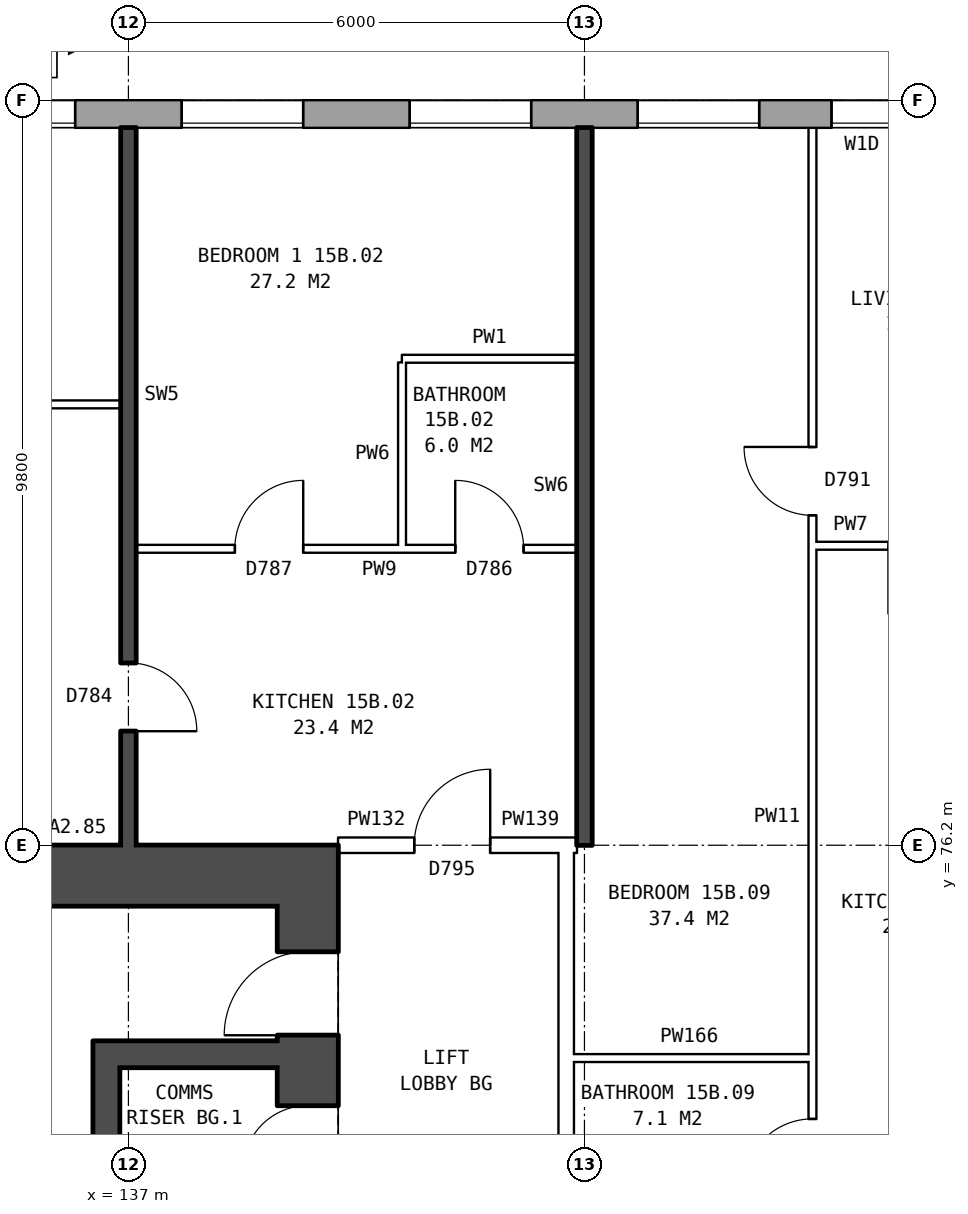
"""IFC4 building model, lengths in metres.
Left out: names, types, materials, properties, quantities, classifications, styles, units other than length and angle.
Written with IfcOpenShell. Run it as: python <this file> out.ifc"""

import sys

from ifc_helpers import new_model, si_unit, direction, frame, frame_2d, origin, place, context, subcontext, project, spatial, rectangle, extrude, element, fill, save


model = new_model("IFC4")
c1 = context("Model", 3, precision=1e-05, world=origin(), true_north=direction((0.0, 1.0)))
c2 = subcontext(c1, "Body", "Model", "MODEL_VIEW")
j1 = project(units=[si_unit("LENGTHUNIT", "METRE"), si_unit("PLANEANGLEUNIT", "RADIAN")], contexts=[c1])
p1 = place(None, origin())
s1 = spatial("IfcSite", under=j1, at=p1, CompositionType="ELEMENT")
p2 = place(p1, origin())
s2 = spatial("IfcBuilding", under=s1, at=p2, CompositionType="ELEMENT")
p3 = place(p2, frame((0.0, 0.0, 56.7)))
s3 = spatial("IfcBuildingStorey", under=s2, at=p3, CompositionType="ELEMENT", Elevation=56.7)
p4 = place(p3, frame((173.425, 85.82, 0.0), z_axis=(0.0, 0.0, 1.0), x_axis=(-1.0, 0.0, 0.0)))
e1 = element("IfcWall", 1, at=p4, inside=s3, PredefinedType="STANDARD", context=c2, shape_type="SweptSolid", body=[
    extrude(rectangle(XDim=39.351, YDim=0.36, at=frame_2d((19.675, 0.0))), origin(), (0.0, 0.0, 1.0), 2.85),
])
p5 = place(p4, frame((1.125, 0.0, 0.8)))
e2 = element("IfcOpeningElement", 2, at=p5, cuts=e1, PredefinedType="OPENING", context=c2, shape_type="SweptSolid", body=[
    extrude(rectangle(XDim=1.6, YDim=1.8, at=frame_2d((0.8, 0.9))), frame((0.0, 0.19, 0.0), z_axis=(0.0, -1.0, 0.0), x_axis=(1.0, 0.0, 0.0)), (0.0, 0.0, 1.0), 0.38),
])
p6 = place(p4, frame((4.125, 0.0, 0.8)))
e3 = element("IfcOpeningElement", 3, at=p6, cuts=e1, PredefinedType="OPENING", context=c2, shape_type="SweptSolid", body=[
    extrude(rectangle(XDim=1.6, YDim=1.8, at=frame_2d((0.8, 0.9))), frame((0.0, 0.19, 0.0), z_axis=(0.0, -1.0, 0.0), x_axis=(1.0, 0.0, 0.0)), (0.0, 0.0, 1.0), 0.38),
])
p7 = place(p4, frame((7.125, 0.0, 0.8)))
e4 = element("IfcOpeningElement", 4, at=p7, cuts=e1, PredefinedType="OPENING", context=c2, shape_type="SweptSolid", body=[
    extrude(rectangle(XDim=1.6, YDim=1.8, at=frame_2d((0.8, 0.9))), frame((0.0, 0.19, 0.0), z_axis=(0.0, -1.0, 0.0), x_axis=(1.0, 0.0, 0.0)), (0.0, 0.0, 1.0), 0.38),
])
p8 = place(p4, frame((10.125, 0.0, 0.8)))
e5 = element("IfcOpeningElement", 5, at=p8, cuts=e1, PredefinedType="OPENING", context=c2, shape_type="SweptSolid", body=[
    extrude(rectangle(XDim=1.6, YDim=1.8, at=frame_2d((0.8, 0.9))), frame((0.0, 0.19, 0.0), z_axis=(0.0, -1.0, 0.0), x_axis=(1.0, 0.0, 0.0)), (0.0, 0.0, 1.0), 0.38),
])
p9 = place(p4, frame((12.625, 0.0, 1.25)))
e6 = element("IfcOpeningElement", 6, at=p9, cuts=e1, PredefinedType="OPENING", context=c2, shape_type="SweptSolid", body=[
    extrude(rectangle(XDim=0.8, YDim=1.2, at=frame_2d((0.4, 0.6))), frame((0.0, 0.19, 0.0), z_axis=(0.0, -1.0, 0.0), x_axis=(1.0, 0.0, 0.0)), (0.0, 0.0, 1.0), 0.38),
])
p10 = place(p4, frame((16.125, 0.0, 0.8)))
e7 = element("IfcOpeningElement", 7, at=p10, cuts=e1, PredefinedType="OPENING", context=c2, shape_type="SweptSolid", body=[
    extrude(rectangle(XDim=1.6, YDim=1.8, at=frame_2d((0.8, 0.9))), frame((0.0, 0.19, 0.0), z_axis=(0.0, -1.0, 0.0), x_axis=(1.0, 0.0, 0.0)), (0.0, 0.0, 1.0), 0.38),
])
p11 = place(p4, frame((19.125, 0.0, 0.8)))
e8 = element("IfcOpeningElement", 8, at=p11, cuts=e1, PredefinedType="OPENING", context=c2, shape_type="SweptSolid", body=[
    extrude(rectangle(XDim=1.6, YDim=1.8, at=frame_2d((0.8, 0.9))), frame((0.0, 0.19, 0.0), z_axis=(0.0, -1.0, 0.0), x_axis=(1.0, 0.0, 0.0)), (0.0, 0.0, 1.0), 0.38),
])
p12 = place(p4, frame((21.575, 0.0, 0.8)))
e9 = element("IfcOpeningElement", 9, at=p12, cuts=e1, PredefinedType="OPENING", context=c2, shape_type="SweptSolid", body=[
    extrude(rectangle(XDim=1.4, YDim=1.8, at=frame_2d((0.7, 0.9))), frame((0.0, 0.19, 0.0), z_axis=(0.0, -1.0, 0.0), x_axis=(1.0, 0.0, 0.0)), (0.0, 0.0, 1.0), 0.38),
])
p13 = place(p4, frame((25.275, 0.0, 1.7)))
e10 = element("IfcOpeningElement", 10, at=p13, cuts=e1, PredefinedType="OPENING", context=c2, shape_type="SweptSolid", body=[
    extrude(rectangle(XDim=0.8, YDim=0.9, at=frame_2d((0.4, 0.45))), frame((0.0, 0.19, 0.0), z_axis=(0.0, -1.0, 0.0), x_axis=(1.0, 0.0, 0.0)), (0.0, 0.0, 1.0), 0.38),
])
p14 = place(p4, frame((28.125, 0.0, 0.8)))
e11 = element("IfcOpeningElement", 11, at=p14, cuts=e1, PredefinedType="OPENING", context=c2, shape_type="SweptSolid", body=[
    extrude(rectangle(XDim=1.6, YDim=1.8, at=frame_2d((0.8, 0.9))), frame((0.0, 0.19, 0.0), z_axis=(0.0, -1.0, 0.0), x_axis=(1.0, 0.0, 0.0)), (0.0, 0.0, 1.0), 0.38),
])
p15 = place(p4, frame((31.125, 0.0, 0.8)))
e12 = element("IfcOpeningElement", 12, at=p15, cuts=e1, PredefinedType="OPENING", context=c2, shape_type="SweptSolid", body=[
    extrude(rectangle(XDim=1.6, YDim=1.8, at=frame_2d((0.8, 0.9))), frame((0.0, 0.19, 0.0), z_axis=(0.0, -1.0, 0.0), x_axis=(1.0, 0.0, 0.0)), (0.0, 0.0, 1.0), 0.38),
])
p16 = place(p4, frame((34.125, 0.0, 0.8)))
e13 = element("IfcOpeningElement", 13, at=p16, cuts=e1, PredefinedType="OPENING", context=c2, shape_type="SweptSolid", body=[
    extrude(rectangle(XDim=1.6, YDim=1.8, at=frame_2d((0.8, 0.9))), frame((0.0, 0.19, 0.0), z_axis=(0.0, -1.0, 0.0), x_axis=(1.0, 0.0, 0.0)), (0.0, 0.0, 1.0), 0.38),
])
p17 = place(p4, frame((37.125, 0.0, 0.8)))
e14 = element("IfcOpeningElement", 14, at=p17, cuts=e1, PredefinedType="OPENING", context=c2, shape_type="SweptSolid", body=[
    extrude(rectangle(XDim=1.6, YDim=1.8, at=frame_2d((0.8, 0.9))), frame((0.0, 0.19, 0.0), z_axis=(0.0, -1.0, 0.0), x_axis=(1.0, 0.0, 0.0)), (0.0, 0.0, 1.0), 0.38),
])
p18 = place(p4, frame((15.125, 0.0, 0.65)))
e15 = element("IfcOpeningElement", 15, at=p18, cuts=e1, PredefinedType="OPENING", context=c2, shape_type="SweptSolid", body=[
    extrude(rectangle(XDim=0.6, YDim=0.9, at=frame_2d((0.3, 0.45))), frame((0.0, 0.19, 0.0), z_axis=(0.0, -1.0, 0.0), x_axis=(1.0, 0.0, 0.0)), (0.0, 0.0, 1.0), 0.38),
])
p19 = place(p4, frame((23.275, 0.0, 0.8)))
e16 = element("IfcOpeningElement", 16, at=p19, cuts=e1, PredefinedType="OPENING", context=c2, shape_type="SweptSolid", body=[
    extrude(rectangle(XDim=0.8, YDim=0.9, at=frame_2d((0.4, 0.45))), frame((0.0, 0.19, 0.0), z_axis=(0.0, -1.0, 0.0), x_axis=(1.0, 0.0, 0.0)), (0.0, 0.0, 1.0), 0.38),
])
p20 = place(p4, frame((26.375, 0.0, 0.8)))
e17 = element("IfcOpeningElement", 17, at=p20, cuts=e1, PredefinedType="OPENING", context=c2, shape_type="SweptSolid", body=[
    extrude(rectangle(XDim=0.8, YDim=1.8, at=frame_2d((0.4, 0.9))), frame((0.0, 0.19, 0.0), z_axis=(0.0, -1.0, 0.0), x_axis=(1.0, 0.0, 0.0)), (0.0, 0.0, 1.0), 0.38),
])
p21 = place(p3, frame((139.36, 64.6, 0.0), z_axis=(0.0, 0.0, 1.0), x_axis=(0.0, 1.0, 0.0)))
e18 = element("IfcWall", 18, at=p21, inside=s3, PredefinedType="SHEAR", context=c2, shape_type="SweptSolid", body=[
    extrude(rectangle(XDim=10.8, YDim=0.8, at=frame_2d((5.4, 0.0))), origin(), (0.0, 0.0, 1.0), 2.85),
])
p22 = place(p21, frame((0.525, 0.0, 0.0)))
e19 = element("IfcOpeningElement", 19, at=p22, cuts=e18, PredefinedType="OPENING", context=c2, shape_type="SweptSolid", body=[
    extrude(rectangle(XDim=1.1, YDim=2.1, at=frame_2d((0.55, 1.05))), frame((0.0, 0.41, 0.0), z_axis=(0.0, -1.0, 0.0), x_axis=(1.0, 0.0, 0.0)), (0.0, 0.0, 1.0), 0.82),
])
p23 = place(p21, frame((9.1, 0.0, 0.0)))
e20 = element("IfcOpeningElement", 20, at=p23, cuts=e18, PredefinedType="OPENING", context=c2, shape_type="SweptSolid", body=[
    extrude(rectangle(XDim=1.1, YDim=2.1, at=frame_2d((0.55, 1.05))), frame((0.0, 0.41, 0.0), z_axis=(0.0, -1.0, 0.0), x_axis=(1.0, 0.0, 0.0)), (0.0, 0.0, 1.0), 0.82),
])
p24 = place(p21, frame((7.325, 0.0, 0.0)))
e21 = element("IfcOpeningElement", 21, at=p24, cuts=e18, PredefinedType="OPENING", context=c2, shape_type="SweptSolid", body=[
    extrude(rectangle(XDim=0.85, YDim=2.1, at=frame_2d((0.425, 1.05))), frame((0.0, 0.41, 0.0), z_axis=(0.0, -1.0, 0.0), x_axis=(1.0, 0.0, 0.0)), (0.0, 0.0, 1.0), 0.82),
])
p25 = place(p3, frame((139.76, 75.8, 0.0), z_axis=(0.0, 0.0, 1.0), x_axis=(-1.0, 0.0, 0.0)))
e22 = element("IfcWall", 22, at=p25, inside=s3, PredefinedType="SHEAR", context=c2, shape_type="SweptSolid", body=[
    extrude(rectangle(XDim=8.4, YDim=0.8, at=frame_2d((4.2, 0.0))), origin(), (0.0, 0.0, 1.0), 2.85),
])
p26 = place(p3, frame((138.96, 73.45, 0.0), z_axis=(0.0, 0.0, 1.0), x_axis=(-1.0, 0.0, 0.0)))
e23 = element("IfcWall", 23, at=p26, inside=s3, PredefinedType="SHEAR", context=c2, shape_type="SweptSolid", body=[
    extrude(rectangle(XDim=2.075, YDim=0.35, at=frame_2d((1.038, 0.0))), origin(), (0.0, 0.0, 1.0), 2.85),
])
p27 = place(p3, frame((136.71, 71.425, 0.0), z_axis=(0.0, 0.0, 1.0), x_axis=(0.0, 1.0, 0.0)))
e24 = element("IfcWall", 24, at=p27, inside=s3, PredefinedType="SHEAR", context=c2, shape_type="SweptSolid", body=[
    extrude(rectangle(XDim=2.2, YDim=0.35, at=frame_2d((1.1, 0.0))), origin(), (0.0, 0.0, 1.0), 2.85),
])
p28 = place(p3, frame((142.76, 63.9, 0.0), z_axis=(0.0, 0.0, 1.0), x_axis=(0.0, 1.0, 0.0)))
e25 = element("IfcWall", 25, at=p28, inside=s3, PredefinedType="PARTITIONING", context=c2, shape_type="SweptSolid", body=[
    extrude(rectangle(XDim=12.2, YDim=0.2, at=frame_2d((6.1, 0.0))), origin(), (0.0, 0.0, 1.0), 2.85),
])
p29 = place(p28, frame((5.1, 0.0, 0.0)))
e26 = element("IfcOpeningElement", 26, at=p29, cuts=e25, PredefinedType="OPENING", context=c2, shape_type="SweptSolid", body=[
    extrude(rectangle(XDim=2.0, YDim=2.1, at=frame_2d((1.0, 1.05))), frame((0.0, 0.11, 0.0), z_axis=(0.0, -1.0, 0.0), x_axis=(1.0, 0.0, 0.0)), (0.0, 0.0, 1.0), 0.22),
])
p30 = place(p3, frame((142.76, 73.4, 0.0), z_axis=(0.0, 0.0, 1.0), x_axis=(1.0, 0.0, 0.0)))
e27 = element("IfcWall", 27, at=p30, inside=s3, PredefinedType="PARTITIONING", context=c2, shape_type="SweptSolid", body=[
    extrude(rectangle(XDim=3.24, YDim=0.1, at=frame_2d((1.62, 0.0))), origin(), (0.0, 0.0, 1.0), 2.85),
])
p31 = place(p3, frame((139.76, 76.2, 0.0), z_axis=(0.0, 0.0, 1.0), x_axis=(1.0, 0.0, 0.0)))
e28 = element("IfcWall", 28, at=p31, inside=s3, PredefinedType="PARTITIONING", context=c2, shape_type="SweptSolid", body=[
    extrude(rectangle(XDim=3.0, YDim=0.2, at=frame_2d((1.5, 0.0))), origin(), (0.0, 0.0, 1.0), 2.85),
])
p32 = place(p31, frame((1.0, 0.0, 0.0)))
e29 = element("IfcOpeningElement", 29, at=p32, cuts=e28, PredefinedType="OPENING", context=c2, shape_type="SweptSolid", body=[
    extrude(rectangle(XDim=1.0, YDim=2.1, at=frame_2d((0.5, 1.05))), frame((0.0, 0.11, 0.0), z_axis=(0.0, -1.0, 0.0), x_axis=(1.0, 0.0, 0.0)), (0.0, 0.0, 1.0), 0.22),
])
p33 = place(p3, frame((142.76, 76.2, 0.0), z_axis=(0.0, 0.0, 1.0), x_axis=(1.0, 0.0, 0.0)))
e30 = element("IfcWall", 30, at=p33, inside=s3, PredefinedType="PARTITIONING", context=c2, shape_type="SweptSolid", body=[
    extrude(rectangle(XDim=0.14, YDim=0.2, at=frame_2d((0.07, 0.0))), origin(), (0.0, 0.0, 1.0), 2.85),
])
p34 = place(p3, frame((137.1, 80.1, 0.0), z_axis=(0.0, 0.0, 1.0), x_axis=(1.0, 0.0, 0.0)))
e31 = element("IfcWall", 31, at=p34, inside=s3, PredefinedType="PARTITIONING", context=c2, shape_type="SweptSolid", body=[
    extrude(rectangle(XDim=5.8, YDim=0.1, at=frame_2d((2.9, 0.0))), origin(), (0.0, 0.0, 1.0), 2.85),
])
p35 = place(p34, frame((1.3, 0.0, 0.0)))
e32 = element("IfcOpeningElement", 32, at=p35, cuts=e31, PredefinedType="OPENING", context=c2, shape_type="SweptSolid", body=[
    extrude(rectangle(XDim=0.9, YDim=2.1, at=frame_2d((0.45, 1.05))), frame((0.0, 0.06, 0.0), z_axis=(0.0, -1.0, 0.0), x_axis=(1.0, 0.0, 0.0)), (0.0, 0.0, 1.0), 0.12),
])
p36 = place(p34, frame((4.2, 0.0, 0.0)))
e33 = element("IfcOpeningElement", 33, at=p36, cuts=e31, PredefinedType="OPENING", context=c2, shape_type="SweptSolid", body=[
    extrude(rectangle(XDim=0.9, YDim=2.1, at=frame_2d((0.45, 1.05))), frame((0.0, 0.06, 0.0), z_axis=(0.0, -1.0, 0.0), x_axis=(1.0, 0.0, 0.0)), (0.0, 0.0, 1.0), 0.12),
])
p37 = place(p3, frame((146.0, 80.14, 0.0), z_axis=(0.0, 0.0, 1.0), x_axis=(1.0, 0.0, 0.0)))
e34 = element("IfcWall", 34, at=p37, inside=s3, PredefinedType="PARTITIONING", context=c2, shape_type="SweptSolid", body=[
    extrude(rectangle(XDim=2.9, YDim=0.1, at=frame_2d((1.45, 0.0))), origin(), (0.0, 0.0, 1.0), 2.85),
])
p38 = place(p37, frame((1.0, 0.0, 0.0)))
e35 = element("IfcOpeningElement", 35, at=p38, cuts=e34, PredefinedType="OPENING", context=c2, shape_type="SweptSolid", body=[
    extrude(rectangle(XDim=0.9, YDim=2.1, at=frame_2d((0.45, 1.05))), frame((0.0, 0.06, 0.0), z_axis=(0.0, -1.0, 0.0), x_axis=(1.0, 0.0, 0.0)), (0.0, 0.0, 1.0), 0.12),
])
p39 = place(p3, frame((131.36, 82.0, 0.0), z_axis=(0.0, 0.0, 1.0), x_axis=(1.0, 0.0, 0.0)))
e36 = element("IfcWall", 36, at=p39, inside=s3, PredefinedType="PARTITIONING", context=c2, shape_type="SweptSolid", body=[
    extrude(rectangle(XDim=5.54, YDim=0.1, at=frame_2d((2.77, 0.0))), origin(), (0.0, 0.0, 1.0), 2.85),
])
p40 = place(p39, frame((2.32, 0.0, 0.0)))
e37 = element("IfcOpeningElement", 37, at=p40, cuts=e36, PredefinedType="OPENING", context=c2, shape_type="SweptSolid", body=[
    extrude(rectangle(XDim=0.9, YDim=2.1, at=frame_2d((0.45, 1.05))), frame((0.0, 0.06, 0.0), z_axis=(0.0, -1.0, 0.0), x_axis=(1.0, 0.0, 0.0)), (0.0, 0.0, 1.0), 0.12),
])
p41 = place(p3, frame((140.6, 82.6, 0.0), z_axis=(0.0, 0.0, 1.0), x_axis=(1.0, 0.0, 0.0)))
e38 = element("IfcWall", 38, at=p41, inside=s3, PredefinedType="PARTITIONING", context=c2, shape_type="SweptSolid", body=[
    extrude(rectangle(XDim=2.3, YDim=0.1, at=frame_2d((1.15, 0.0))), origin(), (0.0, 0.0, 1.0), 2.85),
])
p42 = place(p3, frame((137.0, 76.2, 0.0), z_axis=(0.0, 0.0, 1.0), x_axis=(0.0, 1.0, 0.0)))
e39 = element("IfcWall", 39, at=p42, inside=s3, PredefinedType="SOLIDWALL", context=c2, shape_type="SweptSolid", body=[
    extrude(rectangle(XDim=9.44, YDim=0.2, at=frame_2d((4.72, 0.0))), origin(), (0.0, 0.0, 1.0), 2.85),
])
p43 = place(p42, frame((1.5, 0.0, 0.0)))
e40 = element("IfcOpeningElement", 40, at=p43, cuts=e39, PredefinedType="OPENING", context=c2, shape_type="SweptSolid", body=[
    extrude(rectangle(XDim=0.9, YDim=2.1, at=frame_2d((0.45, 1.05))), frame((0.0, 0.11, 0.0), z_axis=(0.0, -1.0, 0.0), x_axis=(1.0, 0.0, 0.0)), (0.0, 0.0, 1.0), 0.22),
])
p44 = place(p3, frame((140.6, 80.15, 0.0), z_axis=(0.0, 0.0, 1.0), x_axis=(0.0, 1.0, 0.0)))
e41 = element("IfcWall", 41, at=p44, inside=s3, PredefinedType="PARTITIONING", context=c2, shape_type="SweptSolid", body=[
    extrude(rectangle(XDim=2.4, YDim=0.1, at=frame_2d((1.2, 0.0))), origin(), (0.0, 0.0, 1.0), 2.85),
])
p45 = place(p3, frame((143.0, 76.2, 0.0), z_axis=(0.0, 0.0, 1.0), x_axis=(0.0, 1.0, 0.0)))
e42 = element("IfcWall", 42, at=p45, inside=s3, PredefinedType="SOLIDWALL", context=c2, shape_type="SweptSolid", body=[
    extrude(rectangle(XDim=9.44, YDim=0.2, at=frame_2d((4.72, 0.0))), origin(), (0.0, 0.0, 1.0), 2.85),
])
p46 = place(p3, frame((146.0, 71.3, 0.0), z_axis=(0.0, 0.0, 1.0), x_axis=(0.0, 1.0, 0.0)))
e43 = element("IfcWall", 43, at=p46, inside=s3, PredefinedType="PARTITIONING", context=c2, shape_type="SweptSolid", body=[
    extrude(rectangle(XDim=14.34, YDim=0.1, at=frame_2d((7.17, 0.0))), origin(), (0.0, 0.0, 1.0), 2.85),
])
p47 = place(p46, frame((9.24, 0.0, 0.0)))
e44 = element("IfcOpeningElement", 44, at=p47, cuts=e43, PredefinedType="OPENING", context=c2, shape_type="SweptSolid", body=[
    extrude(rectangle(XDim=0.9, YDim=2.1, at=frame_2d((0.45, 1.05))), frame((0.0, 0.06, 0.0), z_axis=(0.0, -1.0, 0.0), x_axis=(1.0, 0.0, 0.0)), (0.0, 0.0, 1.0), 0.12),
])
p48 = place(p46, frame((0.4, 0.0, 0.0)))
e45 = element("IfcOpeningElement", 45, at=p48, cuts=e43, PredefinedType="OPENING", context=c2, shape_type="SweptSolid", body=[
    extrude(rectangle(XDim=0.9, YDim=2.1, at=frame_2d((0.45, 1.05))), frame((0.0, 0.06, 0.0), z_axis=(0.0, -1.0, 0.0), x_axis=(1.0, 0.0, 0.0)), (0.0, 0.0, 1.0), 0.12),
])
p49 = place(p14, origin())
e46 = element("IfcWindow", 46, at=p49, inside=s3, PartitioningType="SINGLE_PANEL", PredefinedType="WINDOW", context=c2, shape_type="SweptSolid", body=[
    extrude(rectangle(XDim=1.6, YDim=1.8, at=frame_2d((0.8, 0.9))), frame((0.0, 0.15, 0.0), z_axis=(0.0, -1.0, 0.0), x_axis=(1.0, 0.0, 0.0)), (0.0, 0.0, 1.0), 0.06),
])
fill(e11, e46)
p50 = place(p15, origin())
e47 = element("IfcWindow", 47, at=p50, inside=s3, PartitioningType="SINGLE_PANEL", PredefinedType="WINDOW", context=c2, shape_type="SweptSolid", body=[
    extrude(rectangle(XDim=1.6, YDim=1.8, at=frame_2d((0.8, 0.9))), frame((0.0, 0.15, 0.0), z_axis=(0.0, -1.0, 0.0), x_axis=(1.0, 0.0, 0.0)), (0.0, 0.0, 1.0), 0.06),
])
fill(e12, e47)
p51 = place(p16, origin())
e48 = element("IfcWindow", 48, at=p51, inside=s3, PartitioningType="SINGLE_PANEL", PredefinedType="WINDOW", context=c2, shape_type="SweptSolid", body=[
    extrude(rectangle(XDim=1.6, YDim=1.8, at=frame_2d((0.8, 0.9))), frame((0.0, 0.15, 0.0), z_axis=(0.0, -1.0, 0.0), x_axis=(1.0, 0.0, 0.0)), (0.0, 0.0, 1.0), 0.06),
])
fill(e13, e48)
p52 = place(p17, origin())
e49 = element("IfcWindow", 49, at=p52, inside=s3, PartitioningType="SINGLE_PANEL", PredefinedType="WINDOW", context=c2, shape_type="SweptSolid", body=[
    extrude(rectangle(XDim=1.6, YDim=1.8, at=frame_2d((0.8, 0.9))), frame((0.0, 0.15, 0.0), z_axis=(0.0, -1.0, 0.0), x_axis=(1.0, 0.0, 0.0)), (0.0, 0.0, 1.0), 0.06),
])
fill(e14, e49)
p53 = place(p23, origin())
e50 = element("IfcDoor", 50, at=p53, inside=s3, OperationType="SINGLE_SWING_LEFT", PredefinedType="DOOR", context=c2, shape_type="SweptSolid", body=[
    extrude(rectangle(XDim=1.1, YDim=2.1, at=frame_2d((0.55, 1.05))), frame((0.0, 0.385, 0.0), z_axis=(0.0, -1.0, 0.0), x_axis=(1.0, 0.0, 0.0)), (0.0, 0.0, 1.0), 0.05),
])
fill(e20, e50)
p54 = place(p24, origin())
e51 = element("IfcDoor", 51, at=p54, inside=s3, OperationType="SINGLE_SWING_LEFT", PredefinedType="DOOR", context=c2, shape_type="SweptSolid", body=[
    extrude(rectangle(XDim=0.85, YDim=2.1, at=frame_2d((0.425, 1.05))), frame((0.0, 0.385, 0.0), z_axis=(0.0, -1.0, 0.0), x_axis=(1.0, 0.0, 0.0)), (0.0, 0.0, 1.0), 0.05),
])
fill(e21, e51)
p55 = place(p35, origin())
e52 = element("IfcDoor", 52, at=p55, inside=s3, OperationType="SINGLE_SWING_RIGHT", PredefinedType="DOOR", context=c2, shape_type="SweptSolid", body=[
    extrude(rectangle(XDim=0.9, YDim=2.1, at=frame_2d((0.45, 1.05))), frame((0.0, 0.025, 0.0), z_axis=(0.0, -1.0, 0.0), x_axis=(1.0, 0.0, 0.0)), (0.0, 0.0, 1.0), 0.05),
])
fill(e32, e52)
p56 = place(p32, origin())
e53 = element("IfcDoor", 53, at=p56, inside=s3, OperationType="SINGLE_SWING_RIGHT", PredefinedType="DOOR", context=c2, shape_type="SweptSolid", body=[
    extrude(rectangle(XDim=1.0, YDim=2.1, at=frame_2d((0.5, 1.05))), frame((0.0, 0.025, 0.0), z_axis=(0.0, -1.0, 0.0), x_axis=(1.0, 0.0, 0.0)), (0.0, 0.0, 1.0), 0.05),
])
fill(e29, e53)
p57 = place(p43, frame((0.9, 0.0, 0.0), z_axis=(0.0, 0.0, 1.0), x_axis=(-1.0, 0.0, 0.0)))
e54 = element("IfcDoor", 54, at=p57, inside=s3, OperationType="SINGLE_SWING_RIGHT", PredefinedType="DOOR", context=c2, shape_type="SweptSolid", body=[
    extrude(rectangle(XDim=0.9, YDim=2.1, at=frame_2d((0.45, 1.05))), frame((0.0, 0.025, 0.0), z_axis=(0.0, -1.0, 0.0), x_axis=(1.0, 0.0, 0.0)), (0.0, 0.0, 1.0), 0.05),
])
fill(e40, e54)
p58 = place(p36, origin())
e55 = element("IfcDoor", 55, at=p58, inside=s3, OperationType="SINGLE_SWING_LEFT", PredefinedType="DOOR", context=c2, shape_type="SweptSolid", body=[
    extrude(rectangle(XDim=0.9, YDim=2.1, at=frame_2d((0.45, 1.05))), frame((0.0, 0.025, 0.0), z_axis=(0.0, -1.0, 0.0), x_axis=(1.0, 0.0, 0.0)), (0.0, 0.0, 1.0), 0.05),
])
fill(e33, e55)
p59 = place(p47, origin())
e56 = element("IfcDoor", 56, at=p59, inside=s3, OperationType="SINGLE_SWING_RIGHT", PredefinedType="DOOR", context=c2, shape_type="SweptSolid", body=[
    extrude(rectangle(XDim=0.9, YDim=2.1, at=frame_2d((0.45, 1.05))), frame((0.0, 0.025, 0.0), z_axis=(0.0, -1.0, 0.0), x_axis=(1.0, 0.0, 0.0)), (0.0, 0.0, 1.0), 0.05),
])
fill(e44, e56)
p60 = place(p48, origin())
e57 = element("IfcDoor", 57, at=p60, inside=s3, OperationType="SINGLE_SWING_LEFT", PredefinedType="DOOR", context=c2, shape_type="SweptSolid", body=[
    extrude(rectangle(XDim=0.9, YDim=2.1, at=frame_2d((0.45, 1.05))), frame((0.0, 0.025, 0.0), z_axis=(0.0, -1.0, 0.0), x_axis=(1.0, 0.0, 0.0)), (0.0, 0.0, 1.0), 0.05),
])
fill(e45, e57)
p61 = place(p20, origin())
e58 = element("IfcWindow", 58, at=p61, inside=s3, PartitioningType="SINGLE_PANEL", PredefinedType="WINDOW", context=c2, shape_type="SweptSolid", body=[
    extrude(rectangle(XDim=0.8, YDim=1.8, at=frame_2d((0.4, 0.9))), frame((0.0, 0.15, 0.0), z_axis=(0.0, -1.0, 0.0), x_axis=(1.0, 0.0, 0.0)), (0.0, 0.0, 1.0), 0.06),
])
fill(e17, e58)
save(model, sys.argv[1])
